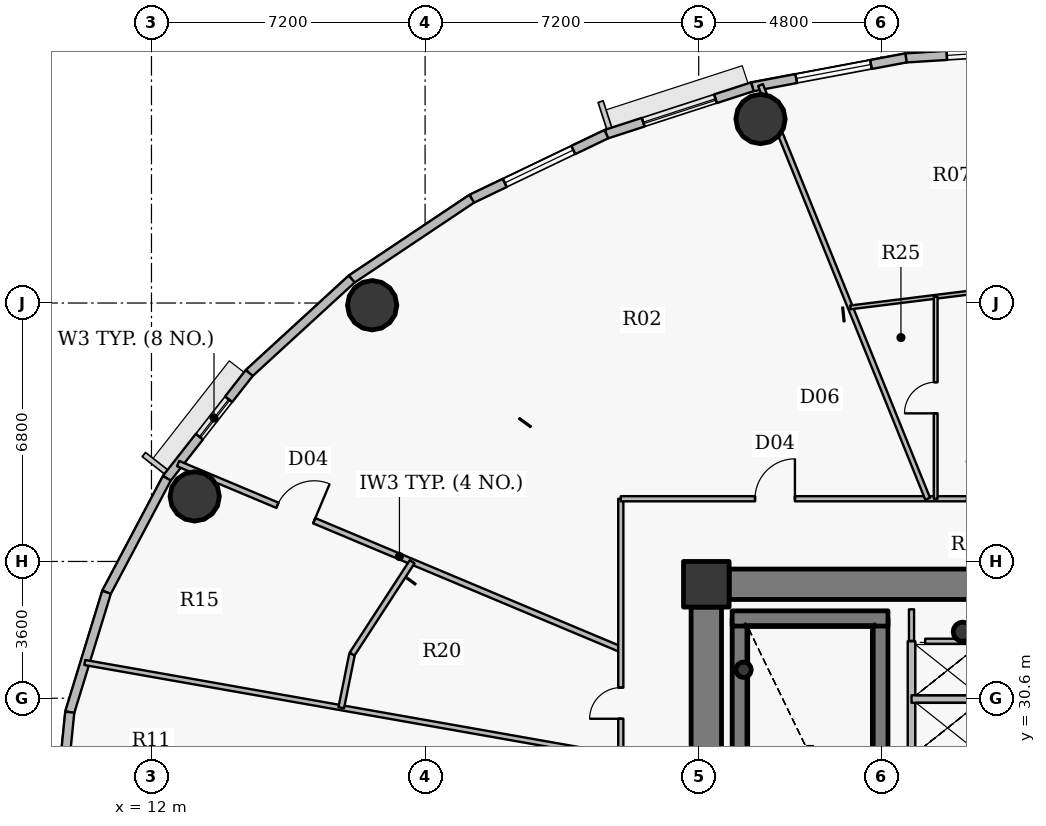
"""IFC4 building model, lengths in metres.
Left out: names, types, materials, properties, quantities, classifications, styles, units other than length and angle.
Written with IfcOpenShell. Run it as: python <this file> out.ifc"""

import sys

from ifc_helpers import new_model, si_unit, direction, frame, frame_2d, origin, origin_2d, place, context, subcontext, project, spatial, rectangle, hollow_circle, extrude, source, transform, mapped, element, fill, save


model = new_model("IFC4")
c1 = context("Model", 3, precision=1e-05, world=origin(), true_north=direction((0.0, 1.0)))
c2 = subcontext(c1, "Body", "Model", "MODEL_VIEW")
j1 = project(units=[si_unit("LENGTHUNIT", "METRE"), si_unit("PLANEANGLEUNIT", "RADIAN")], contexts=[c1])
p1 = place(None, origin())
s1 = spatial("IfcSite", under=j1, at=p1, CompositionType="ELEMENT")
p2 = place(p1, origin())
s2 = spatial("IfcBuilding", under=s1, at=p2, CompositionType="ELEMENT")
p3 = place(p2, frame((0.0, 0.0, 189.9)))
s3 = spatial("IfcBuildingStorey", under=s2, at=p3, CompositionType="ELEMENT", Elevation=189.9)
p4 = place(p3, frame((26.6, 33.6, 0.0), z_axis=(0.0, 0.0, 1.0), x_axis=(1.0, 0.0, 0.0)))
e1 = element("IfcColumn", 1, at=p4, inside=s3, PredefinedType="COLUMN", context=c2, shape_type="SweptSolid", body=[
    extrude(rectangle(XDim=1.2, YDim=1.2, at=origin_2d()), origin(), (0.0, 0.0, 1.0), 3.75),
])
p5 = place(p3, frame((33.35, 32.35, 0.0), z_axis=(0.0, 0.0, 1.0), x_axis=(1.0, 0.0, 0.0)))
e2 = element("IfcColumn", 2, at=p5, inside=s3, PredefinedType="COLUMN", context=c2, shape_type="SweptSolid", body=[
    extrude(hollow_circle(Radius=0.254, WallThickness=0.02, at=origin_2d()), origin(), (0.0, 0.0, 1.0), 3.75),
])
p6 = place(p3, frame((27.48, 24.1, 0.0), z_axis=(0.0, 0.0, 1.0), x_axis=(0.0, 1.0, 0.0)))
e3 = element("IfcWall", 3, at=p6, inside=s3, PredefinedType="SHEAR", context=c2, shape_type="SweptSolid", body=[
    extrude(rectangle(XDim=8.6, YDim=0.4, at=frame_2d((4.3, 0.0))), origin(), (0.0, 0.0, 1.0), 3.75),
])
p7 = place(p3, frame((31.18, 27.8, 0.0), z_axis=(0.0, 0.0, 1.0), x_axis=(0.0, 1.0, 0.0)))
e4 = element("IfcWall", 4, at=p7, inside=s3, PredefinedType="SHEAR", context=c2, shape_type="SweptSolid", body=[
    extrude(rectangle(XDim=4.9, YDim=0.4, at=frame_2d((2.45, 0.0))), origin(), (0.0, 0.0, 1.0), 3.75),
])
p8 = place(p3, frame((27.28, 32.7, 0.0), z_axis=(0.0, 0.0, 1.0), x_axis=(1.0, 0.0, 0.0)))
e5 = element("IfcWall", 5, at=p8, inside=s3, PredefinedType="SHEAR", context=c2, shape_type="SweptSolid", body=[
    extrude(rectangle(XDim=4.1, YDim=0.4, at=frame_2d((2.05, 0.0))), origin(), (0.0, 0.0, 1.0), 3.75),
])
p9 = place(p3, frame((27.58, 31.35, 0.0), z_axis=(0.0, 0.0, 1.0), x_axis=(1.0, 0.0, 0.0)))
e6 = element("IfcColumn", 6, at=p9, inside=s3, PredefinedType="COLUMN", context=c2, shape_type="SweptSolid", body=[
    extrude(hollow_circle(Radius=0.203, WallThickness=0.016, at=origin_2d()), origin(), (0.0, 0.0, 1.0), 3.75),
])
p10 = place(p3, frame((27.2, 33.6, 0.0), z_axis=(0.0, 0.0, 1.0), x_axis=(1.0, 0.0, 0.0)))
e7 = element("IfcWall", 7, at=p10, inside=s3, PredefinedType="SHEAR", context=c2, shape_type="SweptSolid", body=[
    extrude(rectangle(XDim=17.6, YDim=0.8, at=frame_2d((8.8, 0.0))), origin(), (0.0, 0.0, 1.0), 2.95),
])
p11 = place(p10, frame((13.45, 0.0, 0.0)))
e8 = element("IfcOpeningElement", 8, at=p11, cuts=e7, PredefinedType="OPENING", context=c2, shape_type="SweptSolid", body=[
    extrude(rectangle(XDim=1.15, YDim=2.15, at=origin_2d()), frame((0.575, 0.41, 1.075), z_axis=(0.0, -1.0, 0.0), x_axis=(1.0, 0.0, 0.0)), (0.0, 0.0, 1.0), 0.82),
])
p12 = place(p3, frame((26.6, 21.0, 0.0), z_axis=(0.0, 0.0, 1.0), x_axis=(0.0, 1.0, 0.0)))
e9 = element("IfcWall", 9, at=p12, inside=s3, PredefinedType="SHEAR", context=c2, shape_type="SweptSolid", body=[
    extrude(rectangle(XDim=12.0, YDim=0.8, at=frame_2d((6.0, 0.0))), origin(), (0.0, 0.0, 1.0), 2.95),
])
p13 = place(p12, frame((1.061, 0.0, 0.0)))
e10 = element("IfcOpeningElement", 10, at=p13, cuts=e9, PredefinedType="OPENING", context=c2, shape_type="SweptSolid", body=[
    extrude(rectangle(XDim=1.15, YDim=2.15, at=origin_2d()), frame((0.575, 0.41, 1.075), z_axis=(0.0, -1.0, 0.0), x_axis=(1.0, 0.0, 0.0)), (0.0, 0.0, 1.0), 0.82),
])
for number, where, z_axis, x_axis in (
    (11, (28.027, 45.841, 0.0), (0.0, 0.0, 1.0), (1.0, 0.0, 0.0)),
    (12, (17.808, 40.942, 0.0), (0.0, 0.0, 1.0), (1.0, 0.0, 0.0)),
    (13, (13.137, 35.911, 0.0), (0.0, 0.0, 1.0), (1.0, 0.0, 0.0)),
):
    element("IfcColumn", number, at=place(p3, frame(where, z_axis=z_axis, x_axis=x_axis)), inside=s3, PredefinedType="COLUMN", context=c2, shape_type="SweptSolid", body=[
        extrude(hollow_circle(Radius=0.65, WallThickness=0.04, at=origin_2d()), origin(), (0.0, 0.0, 1.0), 3.75),
    ])
p14 = place(p3, frame((31.854, 47.449, 0.0), z_axis=(0.0, 0.0, 1.0), x_axis=(0.998104600619, 0.061540281305, 0.0)))
e14 = element("IfcWall", 14, at=p14, inside=s3, PredefinedType="SOLIDWALL", context=c2, shape_type="SweptSolid", body=[
    extrude(rectangle(XDim=4.154, YDim=0.24, at=frame_2d((2.077, 0.0))), origin(), (0.0, 0.0, 1.0), 3.5),
])
p15 = place(p14, frame((1.077, 0.0, 0.9)))
e15 = element("IfcOpeningElement", 15, at=p15, cuts=e14, PredefinedType="OPENING", context=c2, shape_type="SweptSolid", body=[
    extrude(rectangle(XDim=2.0, YDim=1.75, at=origin_2d()), frame((1.0, 0.13, 0.875), z_axis=(0.0, -1.0, 0.0), x_axis=(1.0, 0.0, 0.0)), (0.0, 0.0, 1.0), 0.26),
])
p16 = place(p3, frame((27.811, 46.689, 0.0), z_axis=(0.0, 0.0, 1.0), x_axis=(0.982788108205, 0.184736391573, 0.0)))
e16 = element("IfcWall", 16, at=p16, inside=s3, PredefinedType="SOLIDWALL", context=c2, shape_type="SweptSolid", body=[
    extrude(rectangle(XDim=4.114, YDim=0.24, at=frame_2d((2.057, 0.0))), origin(), (0.0, 0.0, 1.0), 3.5),
])
p17 = place(p16, frame((1.176, 0.0, 0.9)))
e17 = element("IfcOpeningElement", 17, at=p17, cuts=e16, PredefinedType="OPENING", context=c2, shape_type="SweptSolid", body=[
    extrude(rectangle(XDim=2.0, YDim=1.75, at=origin_2d()), frame((1.0, 0.13, 0.875), z_axis=(0.0, -1.0, 0.0), x_axis=(1.0, 0.0, 0.0)), (0.0, 0.0, 1.0), 0.26),
])
p18 = place(p3, frame((23.97, 45.444, 0.0), z_axis=(0.0, 0.0, 1.0), x_axis=(0.951209870236, 0.30854462038, 0.0)))
e18 = element("IfcWall", 18, at=p18, inside=s3, PredefinedType="SOLIDWALL", context=c2, shape_type="SweptSolid", body=[
    extrude(rectangle(XDim=4.038, YDim=0.24, at=frame_2d((2.019, 0.0))), origin(), (0.0, 0.0, 1.0), 3.5),
])
p19 = place(p18, frame((1.019, 0.0, 0.9)))
e19 = element("IfcOpeningElement", 19, at=p19, cuts=e18, PredefinedType="OPENING", context=c2, shape_type="SweptSolid", body=[
    extrude(rectangle(XDim=2.0, YDim=1.75, at=origin_2d()), frame((1.0, 0.13, 0.875), z_axis=(0.0, -1.0, 0.0), x_axis=(1.0, 0.0, 0.0)), (0.0, 0.0, 1.0), 0.26),
])
p20 = place(p3, frame((20.427, 43.743, 0.0), z_axis=(0.0, 0.0, 1.0), x_axis=(0.901564733809, 0.432644231155, 0.0)))
e20 = element("IfcWall", 20, at=p20, inside=s3, PredefinedType="SOLIDWALL", context=c2, shape_type="SweptSolid", body=[
    extrude(rectangle(XDim=3.93, YDim=0.24, at=frame_2d((1.965, 0.0))), origin(), (0.0, 0.0, 1.0), 3.5),
])
p21 = place(p20, frame((0.965, 0.0, 0.9)))
e21 = element("IfcOpeningElement", 21, at=p21, cuts=e20, PredefinedType="OPENING", context=c2, shape_type="SweptSolid", body=[
    extrude(rectangle(XDim=2.0, YDim=1.75, at=origin_2d()), frame((1.0, 0.13, 0.875), z_axis=(0.0, -1.0, 0.0), x_axis=(1.0, 0.0, 0.0)), (0.0, 0.0, 1.0), 0.26),
])
p22 = place(p3, frame((17.268, 41.631, 0.0), z_axis=(0.0, 0.0, 1.0), x_axis=(0.831228998277, 0.555930168657, 0.0)))
e22 = element("IfcWall", 22, at=p22, inside=s3, PredefinedType="SOLIDWALL", context=c2, shape_type="SweptSolid", body=[
    extrude(rectangle(XDim=3.8, YDim=0.24, at=frame_2d((1.9, 0.0))), origin(), (0.0, 0.0, 1.0), 3.5),
])
p23 = place(p3, frame((14.572, 39.158, 0.0), z_axis=(0.0, 0.0, 1.0), x_axis=(0.737076565834, 0.675809245349, 0.0)))
e23 = element("IfcWall", 23, at=p23, inside=s3, PredefinedType="SOLIDWALL", context=c2, shape_type="SweptSolid", body=[
    extrude(rectangle(XDim=3.658, YDim=0.24, at=frame_2d((1.829, 0.0))), origin(), (0.0, 0.0, 1.0), 3.5),
])
p24 = place(p3, frame((12.404, 36.388, 0.0), z_axis=(0.0, 0.0, 1.0), x_axis=(0.616287674549, 0.787521112224, 0.0)))
e24 = element("IfcWall", 24, at=p24, inside=s3, PredefinedType="SOLIDWALL", context=c2, shape_type="SweptSolid", body=[
    extrude(rectangle(XDim=3.517, YDim=0.24, at=frame_2d((1.759, 0.0))), origin(), (0.0, 0.0, 1.0), 3.5),
])
p25 = place(p24, frame((1.39, 0.0, 0.9)))
e25 = element("IfcOpeningElement", 25, at=p25, cuts=e24, PredefinedType="OPENING", context=c2, shape_type="SweptSolid", body=[
    extrude(rectangle(XDim=1.25, YDim=1.65, at=origin_2d()), frame((0.625, 0.13, 0.825), z_axis=(0.0, -1.0, 0.0), x_axis=(1.0, 0.0, 0.0)), (0.0, 0.0, 1.0), 0.26),
])
p26 = place(p3, frame((10.817, 33.389, 0.0), z_axis=(0.0, 0.0, 1.0), x_axis=(0.467586874938, 0.88394712194, 0.0)))
e26 = element("IfcWall", 26, at=p26, inside=s3, PredefinedType="SOLIDWALL", context=c2, shape_type="SweptSolid", body=[
    extrude(rectangle(XDim=3.393, YDim=0.24, at=frame_2d((1.697, 0.0))), origin(), (0.0, 0.0, 1.0), 3.5),
])
p27 = place(p3, frame((9.85, 30.234, 0.0), z_axis=(0.0, 0.0, 1.0), x_axis=(0.293097995113, 0.956082405058, 0.0)))
e27 = element("IfcWall", 27, at=p27, inside=s3, PredefinedType="SOLIDWALL", context=c2, shape_type="SweptSolid", body=[
    extrude(rectangle(XDim=3.3, YDim=0.24, at=frame_2d((1.65, 0.0))), origin(), (0.0, 0.0, 1.0), 3.5),
])
p28 = place(p3, frame((9.525, 27.0, 0.0), z_axis=(0.0, 0.0, 1.0), x_axis=(0.100061534614, 0.994981250723, 0.0)))
e28 = element("IfcWall", 28, at=p28, inside=s3, PredefinedType="SOLIDWALL", context=c2, shape_type="SweptSolid", body=[
    extrude(rectangle(XDim=3.25, YDim=0.24, at=frame_2d((1.625, 0.0))), origin(), (0.0, 0.0, 1.0), 3.5),
])
p29 = place(p28, frame((1.0, 0.0, 0.9)))
e29 = element("IfcOpeningElement", 29, at=p29, cuts=e28, PredefinedType="OPENING", context=c2, shape_type="SweptSolid", body=[
    extrude(rectangle(XDim=1.25, YDim=1.65, at=origin_2d()), frame((0.625, 0.13, 0.825), z_axis=(0.0, -1.0, 0.0), x_axis=(1.0, 0.0, 0.0)), (0.0, 0.0, 1.0), 0.26),
])
p30 = place(p3, frame((10.246, 31.541, 0.0), z_axis=(0.0, 0.0, 1.0), x_axis=(0.984807060168, -0.173652106936, 0.0)))
e30 = element("IfcWall", 30, at=p30, inside=s3, PredefinedType="PARTITIONING", context=c2, shape_type="SweptSolid", body=[
    extrude(rectangle(XDim=14.322, YDim=0.135, at=frame_2d((7.161, 0.0))), origin(), (0.0, 0.0, 1.0), 2.935),
])
p31 = place(p3, frame((12.7, 36.775, 0.0), z_axis=(0.0, 0.0, 1.0), x_axis=(0.922134788074, -0.386868753745, 0.0)))
e31 = element("IfcWall", 31, at=p31, inside=s3, PredefinedType="PARTITIONING", context=c2, shape_type="SweptSolid", body=[
    extrude(rectangle(XDim=12.633, YDim=0.15, at=frame_2d((6.317, 0.0))), origin(), (0.0, 0.0, 1.0), 2.935),
])
p32 = place(p31, frame((2.834, 0.0, 0.0)))
e32 = element("IfcOpeningElement", 32, at=p32, cuts=e31, PredefinedType="OPENING", context=c2, shape_type="SweptSolid", body=[
    extrude(rectangle(XDim=1.05, YDim=2.15, at=origin_2d()), frame((0.525, 0.085, 1.075), z_axis=(0.0, -1.0, 0.0), x_axis=(1.0, 0.0, 0.0)), (0.0, 0.0, 1.0), 0.17),
])
p33 = place(p3, frame((16.994, 30.351, 0.0), z_axis=(0.0, 0.0, 1.0), x_axis=(0.198136589313, 0.98017441916, 0.0)))
e33 = element("IfcWall", 33, at=p33, inside=s3, PredefinedType="PARTITIONING", context=c2, shape_type="SweptSolid", body=[
    extrude(rectangle(XDim=1.44, YDim=0.15, at=frame_2d((0.72, 0.0))), origin(), (0.0, 0.0, 1.0), 3.5),
])
p34 = place(p3, frame((17.279, 31.763, 0.0), z_axis=(0.0, 0.0, 1.0), x_axis=(0.545388220317, 0.8381835653, 0.0)))
e34 = element("IfcWall", 34, at=p34, inside=s3, PredefinedType="PARTITIONING", context=c2, shape_type="SweptSolid", body=[
    extrude(rectangle(XDim=2.897, YDim=0.15, at=frame_2d((1.448, 0.0))), origin(), (0.0, 0.0, 1.0), 2.935),
])
p35 = place(p3, frame((24.35, 27.95, 0.0), z_axis=(0.0, 0.0, 1.0), x_axis=(0.0, 1.0, 0.0)))
e35 = element("IfcWall", 35, at=p35, inside=s3, PredefinedType="PARTITIONING", context=c2, shape_type="SweptSolid", body=[
    extrude(rectangle(XDim=7.9, YDim=0.135, at=frame_2d((3.95, 0.0))), origin(), (0.0, 0.0, 1.0), 2.935),
])
p36 = place(p35, frame((2.111, 0.0, 0.0)))
e36 = element("IfcOpeningElement", 36, at=p36, cuts=e35, PredefinedType="OPENING", context=c2, shape_type="SweptSolid", body=[
    extrude(rectangle(XDim=0.82, YDim=2.1, at=origin_2d()), frame((0.41, 0.078, 1.05), z_axis=(0.0, -1.0, 0.0), x_axis=(1.0, 0.0, 0.0)), (0.0, 0.0, 1.0), 0.155),
])
p37 = place(p3, frame((24.35, 35.85, 0.0), z_axis=(0.0, 0.0, 1.0), x_axis=(1.0, 0.0, 0.0)))
e37 = element("IfcWall", 37, at=p37, inside=s3, PredefinedType="PARTITIONING", context=c2, shape_type="SweptSolid", body=[
    extrude(rectangle(XDim=9.109, YDim=0.135, at=frame_2d((4.554, 0.0))), origin(), (0.0, 0.0, 1.0), 2.935),
])
p38 = place(p37, frame((3.532, 0.0, 0.0)))
e38 = element("IfcOpeningElement", 38, at=p38, cuts=e37, PredefinedType="OPENING", context=c2, shape_type="SweptSolid", body=[
    extrude(rectangle(XDim=1.05, YDim=2.15, at=origin_2d()), frame((0.525, 0.078, 1.075), z_axis=(0.0, -1.0, 0.0), x_axis=(1.0, 0.0, 0.0)), (0.0, 0.0, 1.0), 0.155),
])
p39 = place(p3, frame((28.027, 46.735, 0.0), z_axis=(0.0, 0.0, 1.0), x_axis=(0.374604711709, -0.927184614824, 0.0)))
e39 = element("IfcWall", 39, at=p39, inside=s3, PredefinedType="PARTITIONING", context=c2, shape_type="SweptSolid", body=[
    extrude(rectangle(XDim=11.74, YDim=0.135, at=frame_2d((5.87, 0.0))), origin(), (0.0, 0.0, 1.0), 2.935),
])
p40 = place(p3, frame((30.39, 40.885, 0.0), z_axis=(0.0, 0.0, 1.0), x_axis=(0.992397005414, 0.123077957591, 0.0)))
e40 = element("IfcWall", 40, at=p40, inside=s3, PredefinedType="PARTITIONING", context=c2, shape_type="SweptSolid", body=[
    extrude(rectangle(XDim=5.653, YDim=0.1, at=frame_2d((2.827, 0.0))), origin(), (0.0, 0.0, 1.0), 2.935),
])
p41 = place(p3, frame((32.0, 24.1, 0.0), z_axis=(0.0, 0.0, 1.0), x_axis=(0.0, 1.0, 0.0)))
e41 = element("IfcWall", 41, at=p41, inside=s3, PredefinedType="PARTITIONING", context=c2, shape_type="SweptSolid", body=[
    extrude(rectangle(XDim=8.0, YDim=0.2, at=frame_2d((4.0, 0.0))), origin(), (0.0, 0.0, 1.0), 3.5),
])
p42 = place(p3, frame((32.0, 30.58, 0.0), z_axis=(0.0, 0.0, 1.0), x_axis=(1.0, 0.0, 0.0)))
e42 = element("IfcWall", 42, at=p42, inside=s3, PredefinedType="PARTITIONING", context=c2, shape_type="SweptSolid", body=[
    extrude(rectangle(XDim=1.9, YDim=0.2, at=frame_2d((0.95, 0.0))), origin(), (0.0, 0.0, 1.0), 3.085),
])
p43 = place(p3, frame((32.636, 35.85, 0.0), z_axis=(0.0, 0.0, 1.0), x_axis=(0.0, 1.0, 0.0)))
e43 = element("IfcWall", 43, at=p43, inside=s3, PredefinedType="PARTITIONING", context=c2, shape_type="SweptSolid", body=[
    extrude(rectangle(XDim=5.314, YDim=0.1, at=frame_2d((2.657, 0.0))), origin(), (0.0, 0.0, 1.0), 2.985),
])
p44 = place(p43, frame((2.247, 0.0, 0.0)))
e44 = element("IfcOpeningElement", 44, at=p44, cuts=e43, PredefinedType="OPENING", context=c2, shape_type="SweptSolid", body=[
    extrude(rectangle(XDim=0.82, YDim=2.1, at=origin_2d()), frame((0.41, 0.06, 1.05), z_axis=(0.0, -1.0, 0.0), x_axis=(1.0, 0.0, 0.0)), (0.0, 0.0, 1.0), 0.12),
])
p45 = place(p3, frame((32.36, 32.1, 0.0), z_axis=(0.0, 0.0, 1.0), x_axis=(1.0, 0.0, 0.0)))
e45 = element("IfcWall", 45, at=p45, inside=s3, PredefinedType="PARTITIONING", context=c2, shape_type="SweptSolid", body=[
    extrude(rectangle(XDim=1.18, YDim=0.135, at=frame_2d((0.59, 0.0))), origin(), (0.0, 0.0, 1.0), 3.085),
])
p46 = place(p3, frame((32.0, 32.94, 0.0), z_axis=(0.0, 0.0, 1.0), x_axis=(0.0, -1.0, 0.0)))
e46 = element("IfcWall", 46, at=p46, inside=s3, PredefinedType="PARTITIONING", context=c2, shape_type="SweptSolid", body=[
    extrude(rectangle(XDim=0.83, YDim=0.135, at=frame_2d((0.415, 0.0))), origin(), (0.0, 0.0, 1.0), 3.035),
])
p47 = place(p3, frame((27.19, 34.0, 0.0), z_axis=(0.0, 0.0, 1.0), x_axis=(-1.0, 0.0, 0.0)))
e47 = element("IfcWall", 47, at=p47, inside=s3, PredefinedType="PARTITIONING", context=c2, shape_type="SweptSolid", body=[
    extrude(rectangle(XDim=0.99, YDim=0.135, at=frame_2d((0.495, 0.0))), origin(), (0.0, 0.0, 1.0), 2.935),
])
p48 = place(p3, frame((26.2, 33.692, 0.0), z_axis=(0.0, 0.0, 1.0), x_axis=(0.0, -1.0, 0.0)))
e48 = element("IfcWall", 48, at=p48, inside=s3, PredefinedType="PARTITIONING", context=c2, shape_type="SweptSolid", body=[
    extrude(rectangle(XDim=0.682, YDim=0.135, at=frame_2d((0.341, 0.0))), origin(), (0.0, 0.0, 1.0), 3.5),
])
m1 = source(origin(), c2, "Body", "SweptSolid", [
    extrude(rectangle(XDim=2.0, YDim=1.75, at=origin_2d()), frame((1.0, 0.03, 0.875), z_axis=(0.0, -1.0, 0.0), x_axis=(1.0, 0.0, 0.0)), (0.0, 0.0, 1.0), 0.06),
])
p49 = place(p15, origin())
e49 = element("IfcWindow", 49, at=p49, inside=s3, PartitioningType="DOUBLE_PANEL_VERTICAL", PredefinedType="WINDOW", context=c2, shape_type="MappedRepresentation", body=[
    mapped(m1, transform((0.0, 0.0, 0.0), x_axis=(1.0, 0.0, 0.0), y_axis=(0.0, 1.0, 0.0), z_axis=(0.0, 0.0, 1.0), scale=1.0)),
])
fill(e15, e49)
p50 = place(p17, origin())
e50 = element("IfcWindow", 50, at=p50, inside=s3, PartitioningType="DOUBLE_PANEL_VERTICAL", PredefinedType="WINDOW", context=c2, shape_type="MappedRepresentation", body=[
    mapped(m1, transform((0.0, 0.0, 0.0), x_axis=(1.0, 0.0, 0.0), y_axis=(0.0, 1.0, 0.0), z_axis=(0.0, 0.0, 1.0), scale=1.0)),
])
fill(e17, e50)
p51 = place(p19, origin())
e51 = element("IfcWindow", 51, at=p51, inside=s3, PartitioningType="DOUBLE_PANEL_VERTICAL", PredefinedType="WINDOW", context=c2, shape_type="MappedRepresentation", body=[
    mapped(m1, transform((0.0, 0.0, 0.0), x_axis=(1.0, 0.0, 0.0), y_axis=(0.0, 1.0, 0.0), z_axis=(0.0, 0.0, 1.0), scale=1.0)),
])
fill(e19, e51)
p52 = place(p21, origin())
e52 = element("IfcWindow", 52, at=p52, inside=s3, PartitioningType="DOUBLE_PANEL_VERTICAL", PredefinedType="WINDOW", context=c2, shape_type="MappedRepresentation", body=[
    mapped(m1, transform((0.0, 0.0, 0.0), x_axis=(1.0, 0.0, 0.0), y_axis=(0.0, 1.0, 0.0), z_axis=(0.0, 0.0, 1.0), scale=1.0)),
])
fill(e21, e52)
m2 = source(origin(), c2, "Body", "SweptSolid", [
    extrude(rectangle(XDim=1.25, YDim=1.65, at=origin_2d()), frame((0.625, 0.03, 0.825), z_axis=(0.0, -1.0, 0.0), x_axis=(1.0, 0.0, 0.0)), (0.0, 0.0, 1.0), 0.06),
])
p53 = place(p25, origin())
e53 = element("IfcWindow", 53, at=p53, inside=s3, PartitioningType="SINGLE_PANEL", PredefinedType="WINDOW", context=c2, shape_type="MappedRepresentation", body=[
    mapped(m2, transform((0.0, 0.0, 0.0), x_axis=(1.0, 0.0, 0.0), y_axis=(0.0, 1.0, 0.0), z_axis=(0.0, 0.0, 1.0), scale=1.0)),
])
fill(e25, e53)
m3 = source(origin(), c2, "Body", "SweptSolid", [
    extrude(rectangle(XDim=0.82, YDim=2.1, at=origin_2d()), frame((0.41, 0.025, 1.05), z_axis=(0.0, -1.0, 0.0), x_axis=(1.0, 0.0, 0.0)), (0.0, 0.0, 1.0), 0.05),
])
p54 = place(p44, origin())
e54 = element("IfcDoor", 54, at=p54, inside=s3, OperationType="SINGLE_SWING_LEFT", PredefinedType="DOOR", context=c2, shape_type="MappedRepresentation", body=[
    mapped(m3, transform((0.0, 0.0, 0.0), x_axis=(1.0, 0.0, 0.0), y_axis=(0.0, 1.0, 0.0), z_axis=(0.0, 0.0, 1.0), scale=1.0)),
])
fill(e44, e54)
m4 = source(origin(), c2, "Body", "SweptSolid", [
    extrude(rectangle(XDim=1.05, YDim=2.15, at=origin_2d()), frame((0.525, 0.025, 1.075), z_axis=(0.0, -1.0, 0.0), x_axis=(1.0, 0.0, 0.0)), (0.0, 0.0, 1.0), 0.05),
])
p55 = place(p38, origin())
e55 = element("IfcDoor", 55, at=p55, inside=s3, OperationType="SINGLE_SWING_RIGHT", PredefinedType="DOOR", context=c2, shape_type="MappedRepresentation", body=[
    mapped(m4, transform((0.0, 0.0, 0.0), x_axis=(1.0, 0.0, 0.0), y_axis=(0.0, 1.0, 0.0), z_axis=(0.0, 0.0, 1.0), scale=1.0)),
])
fill(e38, e55)
p56 = place(p36, origin())
e56 = element("IfcDoor", 56, at=p56, inside=s3, OperationType="SINGLE_SWING_LEFT", PredefinedType="DOOR", context=c2, shape_type="MappedRepresentation", body=[
    mapped(m3, transform((0.0, 0.0, 0.0), x_axis=(1.0, 0.0, 0.0), y_axis=(0.0, 1.0, 0.0), z_axis=(0.0, 0.0, 1.0), scale=1.0)),
])
fill(e36, e56)
p57 = place(p32, origin())
e57 = element("IfcDoor", 57, at=p57, inside=s3, OperationType="SINGLE_SWING_RIGHT", PredefinedType="DOOR", context=c2, shape_type="MappedRepresentation", body=[
    mapped(m4, transform((0.0, 0.0, 0.0), x_axis=(1.0, 0.0, 0.0), y_axis=(0.0, 1.0, 0.0), z_axis=(0.0, 0.0, 1.0), scale=1.0)),
])
fill(e32, e57)
save(model, sys.argv[1])
